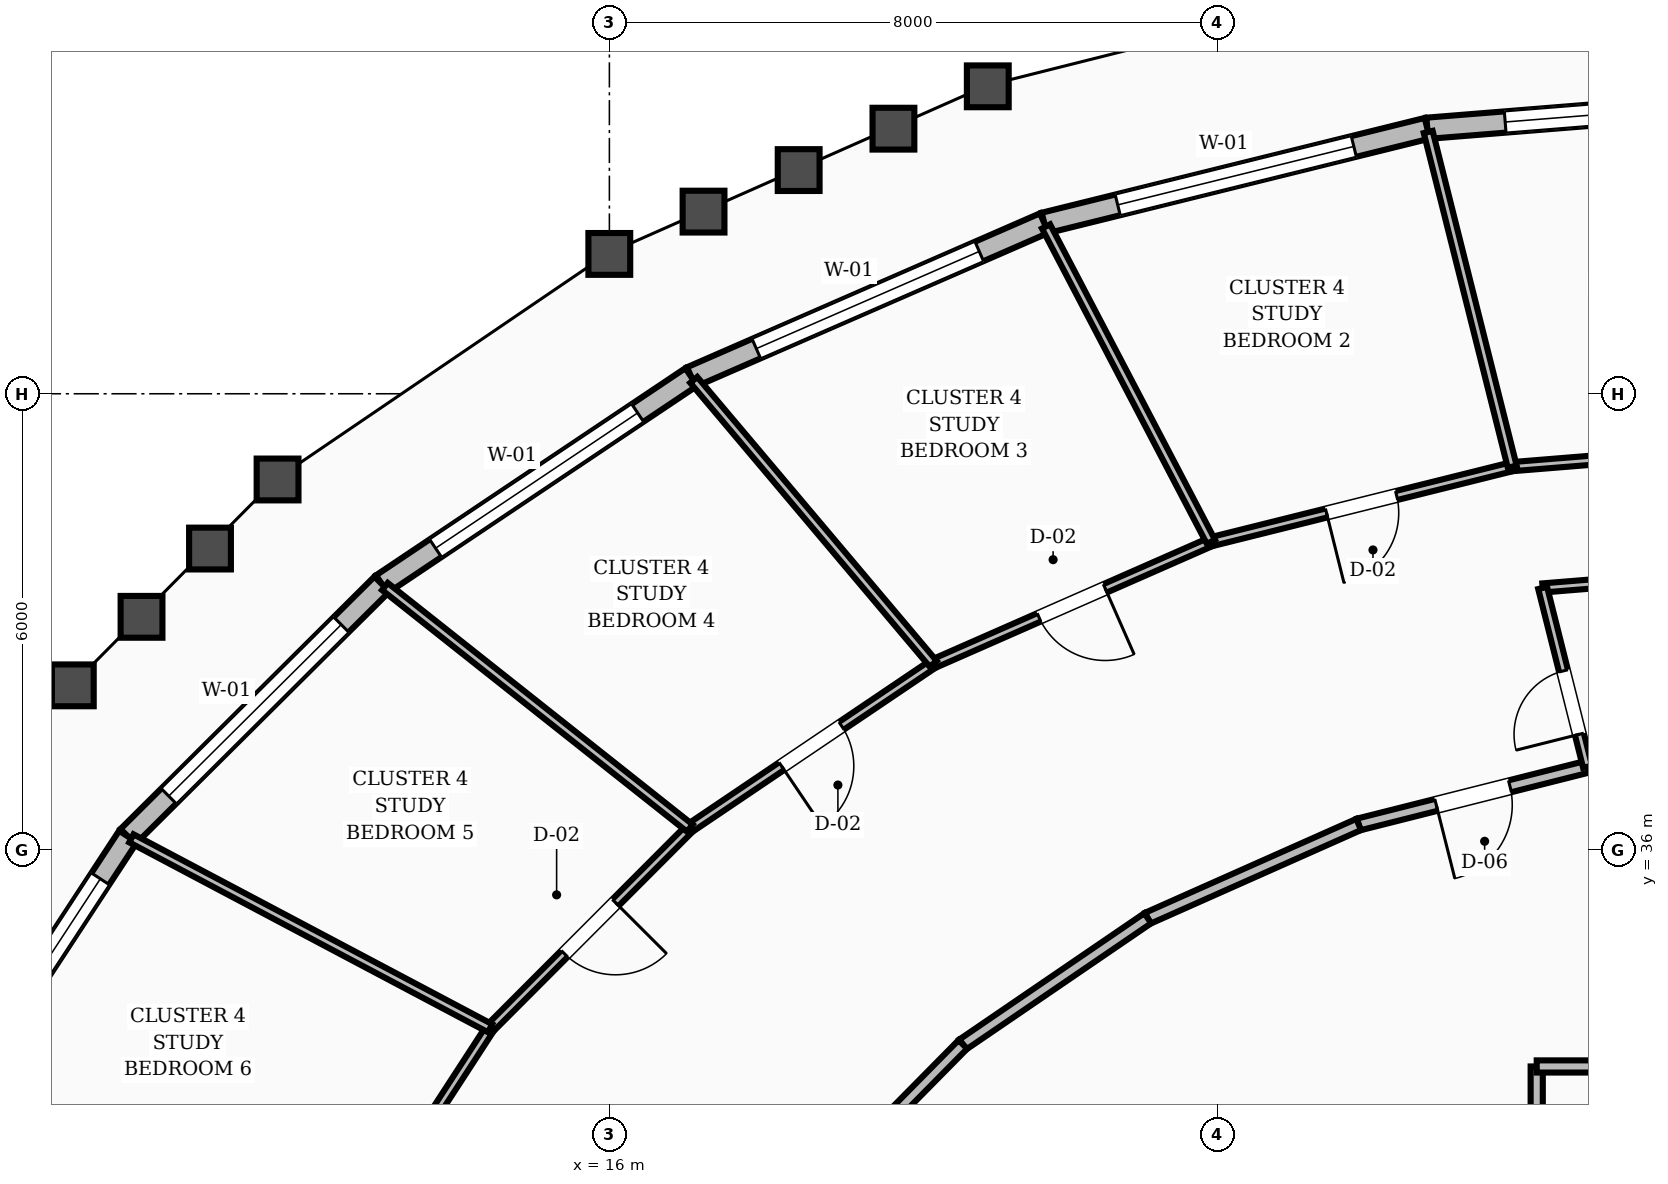
"""IFC4 building model, lengths in metres.
Left out: names, types, materials, properties, quantities, classifications, styles, units other than length and angle.
Written with IfcOpenShell. Run it as: python <this file> out.ifc"""

import sys

from ifc_helpers import new_model, si_unit, direction, frame, frame_2d, origin, place, context, subcontext, project, spatial, rectangle, extrude, element, fill, save


model = new_model("IFC4")
c1 = context("Model", 3, precision=1e-05, world=origin(), true_north=direction((0.0, 1.0)))
c2 = subcontext(c1, "Body", "Model", "MODEL_VIEW")
j1 = project(units=[si_unit("LENGTHUNIT", "METRE"), si_unit("PLANEANGLEUNIT", "RADIAN")], contexts=[c1])
p1 = place(None, origin())
s1 = spatial("IfcSite", under=j1, at=p1, CompositionType="ELEMENT")
p2 = place(p1, origin())
s2 = spatial("IfcBuilding", under=s1, at=p2, CompositionType="ELEMENT")
p3 = place(p2, frame((0.0, 0.0, 102.4)))
s3 = spatial("IfcBuildingStorey", under=s2, at=p3, CompositionType="ELEMENT", Elevation=102.4)
p4 = place(p3, frame((32.0, 45.914, 0.0), z_axis=(0.0, 0.0, 1.0), x_axis=(-0.996785824627, -0.080112544727, 0.0)))
e1 = element("IfcWall", 1, at=p4, inside=s3, PredefinedType="STANDARD", context=c2, shape_type="SweptSolid", body=[
    extrude(rectangle(XDim=5.257, YDim=0.28, at=frame_2d((2.628, 0.0))), origin(), (0.0, 0.0, 1.0), 2.67),
])
p5 = place(p4, frame((1.028, 0.0, 0.8)))
e2 = element("IfcOpeningElement", 2, at=p5, cuts=e1, PredefinedType="OPENING", context=c2, shape_type="SweptSolid", body=[
    extrude(rectangle(XDim=3.2, YDim=1.65, at=frame_2d((1.6, 0.825))), frame((0.0, 0.15, 0.0), z_axis=(0.0, -1.0, 0.0), x_axis=(1.0, 0.0, 0.0)), (0.0, 0.0, 1.0), 0.3),
])
p6 = place(p3, frame((26.76, 45.493, 0.0), z_axis=(0.0, 0.0, 1.0), x_axis=(-0.970712490552, -0.240244168891, 0.0)))
e3 = element("IfcWall", 3, at=p6, inside=s3, PredefinedType="STANDARD", context=c2, shape_type="SweptSolid", body=[
    extrude(rectangle(XDim=5.191, YDim=0.28, at=frame_2d((2.595, 0.0))), origin(), (0.0, 0.0, 1.0), 2.67),
])
p7 = place(p6, frame((0.995, 0.0, 0.8)))
e4 = element("IfcOpeningElement", 4, at=p7, cuts=e3, PredefinedType="OPENING", context=c2, shape_type="SweptSolid", body=[
    extrude(rectangle(XDim=3.2, YDim=1.65, at=frame_2d((1.6, 0.825))), frame((0.0, 0.15, 0.0), z_axis=(0.0, -1.0, 0.0), x_axis=(1.0, 0.0, 0.0)), (0.0, 0.0, 1.0), 0.3),
])
p8 = place(p3, frame((21.721, 44.246, 0.0), z_axis=(0.0, 0.0, 1.0), x_axis=(-0.916638922048, -0.399716257596, 0.0)))
e5 = element("IfcWall", 5, at=p8, inside=s3, PredefinedType="STANDARD", context=c2, shape_type="SweptSolid", body=[
    extrude(rectangle(XDim=5.066, YDim=0.28, at=frame_2d((2.533, 0.0))), origin(), (0.0, 0.0, 1.0), 2.67),
])
p9 = place(p8, frame((0.933, 0.0, 0.8)))
e6 = element("IfcOpeningElement", 6, at=p9, cuts=e5, PredefinedType="OPENING", context=c2, shape_type="SweptSolid", body=[
    extrude(rectangle(XDim=3.2, YDim=1.65, at=frame_2d((1.6, 0.825))), frame((0.0, 0.15, 0.0), z_axis=(0.0, -1.0, 0.0), x_axis=(1.0, 0.0, 0.0)), (0.0, 0.0, 1.0), 0.3),
])
p10 = place(p3, frame((17.078, 42.221, 0.0), z_axis=(0.0, 0.0, 1.0), x_axis=(-0.830936801798, -0.556366813728, 0.0)))
e7 = element("IfcWall", 7, at=p10, inside=s3, PredefinedType="STANDARD", context=c2, shape_type="SweptSolid", body=[
    extrude(rectangle(XDim=4.898, YDim=0.28, at=frame_2d((2.449, 0.0))), origin(), (0.0, 0.0, 1.0), 2.67),
])
p11 = place(p10, frame((0.849, 0.0, 0.8)))
e8 = element("IfcOpeningElement", 8, at=p11, cuts=e7, PredefinedType="OPENING", context=c2, shape_type="SweptSolid", body=[
    extrude(rectangle(XDim=3.2, YDim=1.65, at=frame_2d((1.6, 0.825))), frame((0.0, 0.15, 0.0), z_axis=(0.0, -1.0, 0.0), x_axis=(1.0, 0.0, 0.0)), (0.0, 0.0, 1.0), 0.3),
])
p12 = place(p3, frame((13.007, 39.495, 0.0), z_axis=(0.0, 0.0, 1.0), x_axis=(-0.709177055594, -0.705030427583, 0.0)))
e9 = element("IfcWall", 9, at=p12, inside=s3, PredefinedType="STANDARD", context=c2, shape_type="SweptSolid", body=[
    extrude(rectangle(XDim=4.71, YDim=0.28, at=frame_2d((2.355, 0.0))), origin(), (0.0, 0.0, 1.0), 2.67),
])
p13 = place(p12, frame((0.755, 0.0, 0.8)))
e10 = element("IfcOpeningElement", 10, at=p13, cuts=e9, PredefinedType="OPENING", context=c2, shape_type="SweptSolid", body=[
    extrude(rectangle(XDim=3.2, YDim=1.65, at=frame_2d((1.6, 0.825))), frame((0.0, 0.15, 0.0), z_axis=(0.0, -1.0, 0.0), x_axis=(1.0, 0.0, 0.0)), (0.0, 0.0, 1.0), 0.3),
])
p14 = place(p3, frame((9.667, 36.175, 0.0), z_axis=(0.0, 0.0, 1.0), x_axis=(-0.547989842324, -0.836484986542, 0.0)))
e11 = element("IfcWall", 11, at=p14, inside=s3, PredefinedType="STANDARD", context=c2, shape_type="SweptSolid", body=[
    extrude(rectangle(XDim=4.529, YDim=0.28, at=frame_2d((2.265, 0.0))), origin(), (0.0, 0.0, 1.0), 2.67),
])
p15 = place(p14, frame((0.665, 0.0, 0.8)))
e12 = element("IfcOpeningElement", 12, at=p15, cuts=e11, PredefinedType="OPENING", context=c2, shape_type="SweptSolid", body=[
    extrude(rectangle(XDim=3.2, YDim=1.65, at=frame_2d((1.6, 0.825))), frame((0.0, 0.15, 0.0), z_axis=(0.0, -1.0, 0.0), x_axis=(1.0, 0.0, 0.0)), (0.0, 0.0, 1.0), 0.3),
])
p16 = place(p3, frame((28.2, 31.45, 0.0), z_axis=(0.0, 0.0, 1.0), x_axis=(0.0, 1.0, 0.0)))
e13 = element("IfcWall", 13, at=p16, inside=s3, PredefinedType="SOLIDWALL", context=c2, shape_type="SweptSolid", body=[
    extrude(rectangle(XDim=1.7, YDim=0.16, at=frame_2d((0.85, 0.0))), origin(), (0.0, 0.0, 1.0), 2.67),
])
p17 = place(p3, frame((28.2, 33.15, 0.0), z_axis=(0.0, 0.0, 1.0), x_axis=(1.0, 0.0, 0.0)))
e14 = element("IfcWall", 14, at=p17, inside=s3, PredefinedType="SOLIDWALL", context=c2, shape_type="SweptSolid", body=[
    extrude(rectangle(XDim=7.6, YDim=0.16, at=frame_2d((3.8, 0.0))), origin(), (0.0, 0.0, 1.0), 2.67),
])
p18 = place(p17, frame((3.2, 0.0, 0.0)))
e15 = element("IfcOpeningElement", 15, at=p18, cuts=e14, PredefinedType="OPENING", context=c2, shape_type="SweptSolid", body=[
    extrude(rectangle(XDim=1.2, YDim=2.1, at=frame_2d((0.6, 1.05))), frame((0.0, 0.09, 0.0), z_axis=(0.0, -1.0, 0.0), x_axis=(1.0, 0.0, 0.0)), (0.0, 0.0, 1.0), 0.18),
])
p19 = place(p3, frame((32.0, 37.35, 0.0), z_axis=(0.0, 0.0, 1.0), x_axis=(-0.996658973252, -0.081675522876, 0.0)))
e16 = element("IfcWall", 16, at=p19, inside=s3, PredefinedType="SOLIDWALL", context=c2, shape_type="SweptSolid", body=[
    extrude(rectangle(XDim=3.142, YDim=0.16, at=frame_2d((1.571, 0.0))), origin(), (0.0, 0.0, 1.0), 2.67),
])
p20 = place(p3, frame((28.869, 37.094, 0.0), z_axis=(0.0, 0.0, 1.0), x_axis=(-0.969608333194, -0.244662380029, 0.0)))
e17 = element("IfcWall", 17, at=p20, inside=s3, PredefinedType="SOLIDWALL", context=c2, shape_type="SweptSolid", body=[
    extrude(rectangle(XDim=3.105, YDim=0.16, at=frame_2d((1.553, 0.0))), origin(), (0.0, 0.0, 1.0), 2.67),
])
p21 = place(p20, frame((1.053, 0.0, 0.0)))
e18 = element("IfcOpeningElement", 18, at=p21, cuts=e17, PredefinedType="OPENING", context=c2, shape_type="SweptSolid", body=[
    extrude(rectangle(XDim=1.0, YDim=2.1, at=frame_2d((0.5, 1.05))), frame((0.0, 0.09, 0.0), z_axis=(0.0, -1.0, 0.0), x_axis=(1.0, 0.0, 0.0)), (0.0, 0.0, 1.0), 0.18),
])
p22 = place(p3, frame((25.858, 36.334, 0.0), z_axis=(0.0, 0.0, 1.0), x_axis=(-0.913768445178, -0.406235434936, 0.0)))
e19 = element("IfcWall", 19, at=p22, inside=s3, PredefinedType="SOLIDWALL", context=c2, shape_type="SweptSolid", body=[
    extrude(rectangle(XDim=3.037, YDim=0.16, at=frame_2d((1.519, 0.0))), origin(), (0.0, 0.0, 1.0), 2.67),
])
p23 = place(p3, frame((23.083, 35.1, 0.0), z_axis=(0.0, 0.0, 1.0), x_axis=(-0.825929039072, -0.563774088104, 0.0)))
e20 = element("IfcWall", 20, at=p23, inside=s3, PredefinedType="SOLIDWALL", context=c2, shape_type="SweptSolid", body=[
    extrude(rectangle(XDim=2.945, YDim=0.16, at=frame_2d((1.472, 0.0))), origin(), (0.0, 0.0, 1.0), 2.67),
])
p24 = place(p3, frame((20.651, 33.44, 0.0), z_axis=(0.0, 0.0, 1.0), x_axis=(-0.702366174226, -0.711815816981, 0.0)))
e21 = element("IfcWall", 21, at=p24, inside=s3, PredefinedType="SOLIDWALL", context=c2, shape_type="SweptSolid", body=[
    extrude(rectangle(XDim=2.842, YDim=0.16, at=frame_2d((1.421, 0.0))), origin(), (0.0, 0.0, 1.0), 2.67),
])
p25 = place(p3, frame((32.0, 39.748, 0.0), z_axis=(0.0, 0.0, 1.0), x_axis=(-0.99671322873, -0.081010738021, 0.0)))
e22 = element("IfcWall", 22, at=p25, inside=s3, PredefinedType="PARTITIONING", context=c2, shape_type="SweptSolid", body=[
    extrude(rectangle(XDim=3.734, YDim=0.12, at=frame_2d((1.867, 0.0))), origin(), (0.0, 0.0, 1.0), 2.67),
])
p26 = place(p3, frame((28.869, 37.094, 0.0), z_axis=(0.0, 0.0, 1.0), x_axis=(-0.243554174744, 0.969887294465, 0.0)))
e23 = element("IfcWall", 23, at=p26, inside=s3, PredefinedType="PARTITIONING", context=c2, shape_type="SweptSolid", body=[
    extrude(rectangle(XDim=2.425, YDim=0.12, at=frame_2d((1.212, 0.0))), origin(), (0.0, 0.0, 1.0), 2.67),
])
p27 = place(p26, frame((0.44, 0.0, 0.0)))
e24 = element("IfcOpeningElement", 24, at=p27, cuts=e23, PredefinedType="OPENING", context=c2, shape_type="SweptSolid", body=[
    extrude(rectangle(XDim=0.86, YDim=2.1, at=frame_2d((0.43, 1.05))), frame((0.0, 0.07, 0.0), z_axis=(0.0, -1.0, 0.0), x_axis=(1.0, 0.0, 0.0)), (0.0, 0.0, 1.0), 0.14),
])
p28 = place(p3, frame((32.0, 41.375, 0.0), z_axis=(0.0, 0.0, 1.0), x_axis=(-0.996734058242, -0.080754053401, 0.0)))
e25 = element("IfcWall", 25, at=p28, inside=s3, PredefinedType="PARTITIONING", context=c2, shape_type="SweptSolid", body=[
    extrude(rectangle(XDim=4.136, YDim=0.12, at=frame_2d((2.068, 0.0))), origin(), (0.0, 0.0, 1.0), 2.67),
])
p29 = place(p28, frame((1.593, 0.0, 0.0)))
e26 = element("IfcOpeningElement", 26, at=p29, cuts=e25, PredefinedType="OPENING", context=c2, shape_type="SweptSolid", body=[
    extrude(rectangle(XDim=0.95, YDim=2.1, at=frame_2d((0.475, 1.05))), frame((0.0, 0.07, 0.0), z_axis=(0.0, -1.0, 0.0), x_axis=(1.0, 0.0, 0.0)), (0.0, 0.0, 1.0), 0.14),
])
p30 = place(p3, frame((27.878, 41.041, 0.0), z_axis=(0.0, 0.0, 1.0), x_axis=(-0.970268919394, -0.242029386767, 0.0)))
e27 = element("IfcWall", 27, at=p30, inside=s3, PredefinedType="PARTITIONING", context=c2, shape_type="SweptSolid", body=[
    extrude(rectangle(XDim=4.085, YDim=0.12, at=frame_2d((2.043, 0.0))), origin(), (0.0, 0.0, 1.0), 2.67),
])
p31 = place(p30, frame((1.568, 0.0, 0.0)))
e28 = element("IfcOpeningElement", 28, at=p31, cuts=e27, PredefinedType="OPENING", context=c2, shape_type="SweptSolid", body=[
    extrude(rectangle(XDim=0.95, YDim=2.1, at=frame_2d((0.475, 1.05))), frame((0.0, 0.07, 0.0), z_axis=(0.0, -1.0, 0.0), x_axis=(1.0, 0.0, 0.0)), (0.0, 0.0, 1.0), 0.14),
])
p32 = place(p3, frame((27.878, 41.041, 0.0), z_axis=(0.0, 0.0, 1.0), x_axis=(-0.243509845791, 0.969898425096, 0.0)))
e29 = element("IfcWall", 29, at=p32, inside=s3, PredefinedType="PARTITIONING", context=c2, shape_type="SweptSolid", body=[
    extrude(rectangle(XDim=4.54, YDim=0.12, at=frame_2d((2.27, 0.0))), origin(), (0.0, 0.0, 1.0), 2.67),
])
p33 = place(p3, frame((23.914, 40.052, 0.0), z_axis=(0.0, 0.0, 1.0), x_axis=(-0.915498969217, -0.402320316865, 0.0)))
e30 = element("IfcWall", 30, at=p33, inside=s3, PredefinedType="PARTITIONING", context=c2, shape_type="SweptSolid", body=[
    extrude(rectangle(XDim=3.99, YDim=0.12, at=frame_2d((1.995, 0.0))), origin(), (0.0, 0.0, 1.0), 2.67),
])
p34 = place(p33, frame((1.52, 0.0, 0.0)))
e31 = element("IfcOpeningElement", 31, at=p34, cuts=e30, PredefinedType="OPENING", context=c2, shape_type="SweptSolid", body=[
    extrude(rectangle(XDim=0.95, YDim=2.1, at=frame_2d((0.475, 1.05))), frame((0.0, 0.07, 0.0), z_axis=(0.0, -1.0, 0.0), x_axis=(1.0, 0.0, 0.0)), (0.0, 0.0, 1.0), 0.14),
])
p35 = place(p3, frame((23.914, 40.052, 0.0), z_axis=(0.0, 0.0, 1.0), x_axis=(-0.463346351545, 0.886177272621, 0.0)))
e32 = element("IfcWall", 32, at=p35, inside=s3, PredefinedType="PARTITIONING", context=c2, shape_type="SweptSolid", body=[
    extrude(rectangle(XDim=4.682, YDim=0.12, at=frame_2d((2.341, 0.0))), origin(), (0.0, 0.0, 1.0), 2.67),
])
p36 = place(p3, frame((20.26, 38.447, 0.0), z_axis=(0.0, 0.0, 1.0), x_axis=(-0.828896296571, -0.55940229668, 0.0)))
e33 = element("IfcWall", 33, at=p36, inside=s3, PredefinedType="PARTITIONING", context=c2, shape_type="SweptSolid", body=[
    extrude(rectangle(XDim=3.863, YDim=0.12, at=frame_2d((1.931, 0.0))), origin(), (0.0, 0.0, 1.0), 2.67),
])
p37 = place(p36, frame((1.456, 0.0, 0.0)))
e34 = element("IfcOpeningElement", 34, at=p37, cuts=e33, PredefinedType="OPENING", context=c2, shape_type="SweptSolid", body=[
    extrude(rectangle(XDim=0.95, YDim=2.1, at=frame_2d((0.475, 1.05))), frame((0.0, 0.07, 0.0), z_axis=(0.0, -1.0, 0.0), x_axis=(1.0, 0.0, 0.0)), (0.0, 0.0, 1.0), 0.14),
])
p38 = place(p3, frame((20.26, 38.447, 0.0), z_axis=(0.0, 0.0, 1.0), x_axis=(-0.644718627515, 0.764419970524, 0.0)))
e35 = element("IfcWall", 35, at=p38, inside=s3, PredefinedType="PARTITIONING", context=c2, shape_type="SweptSolid", body=[
    extrude(rectangle(XDim=4.887, YDim=0.12, at=frame_2d((2.443, 0.0))), origin(), (0.0, 0.0, 1.0), 2.67),
])
p39 = place(p3, frame((17.059, 36.286, 0.0), z_axis=(0.0, 0.0, 1.0), x_axis=(-0.706450168387, -0.707762784827, 0.0)))
e36 = element("IfcWall", 36, at=p39, inside=s3, PredefinedType="PARTITIONING", context=c2, shape_type="SweptSolid", body=[
    extrude(rectangle(XDim=3.72, YDim=0.12, at=frame_2d((1.86, 0.0))), origin(), (0.0, 0.0, 1.0), 2.67),
])
p40 = place(p39, frame((1.385, 0.0, 0.0)))
e37 = element("IfcOpeningElement", 37, at=p40, cuts=e36, PredefinedType="OPENING", context=c2, shape_type="SweptSolid", body=[
    extrude(rectangle(XDim=0.95, YDim=2.1, at=frame_2d((0.475, 1.05))), frame((0.0, 0.07, 0.0), z_axis=(0.0, -1.0, 0.0), x_axis=(1.0, 0.0, 0.0)), (0.0, 0.0, 1.0), 0.14),
])
p41 = place(p3, frame((17.059, 36.286, 0.0), z_axis=(0.0, 0.0, 1.0), x_axis=(-0.783824285958, 0.620982679905, 0.0)))
e38 = element("IfcWall", 38, at=p41, inside=s3, PredefinedType="PARTITIONING", context=c2, shape_type="SweptSolid", body=[
    extrude(rectangle(XDim=5.118, YDim=0.12, at=frame_2d((2.559, 0.0))), origin(), (0.0, 0.0, 1.0), 2.67),
])
p42 = place(p3, frame((14.431, 33.653, 0.0), z_axis=(0.0, 0.0, 1.0), x_axis=(-0.545007511922, -0.838431161127, 0.0)))
e39 = element("IfcWall", 39, at=p42, inside=s3, PredefinedType="PARTITIONING", context=c2, shape_type="SweptSolid", body=[
    extrude(rectangle(XDim=3.583, YDim=0.12, at=frame_2d((1.792, 0.0))), origin(), (0.0, 0.0, 1.0), 2.67),
])
p43 = place(p42, frame((1.316, 0.0, 0.0)))
e40 = element("IfcOpeningElement", 40, at=p43, cuts=e39, PredefinedType="OPENING", context=c2, shape_type="SweptSolid", body=[
    extrude(rectangle(XDim=0.95, YDim=2.1, at=frame_2d((0.475, 1.05))), frame((0.0, 0.07, 0.0), z_axis=(0.0, -1.0, 0.0), x_axis=(1.0, 0.0, 0.0)), (0.0, 0.0, 1.0), 0.14),
])
p44 = place(p3, frame((14.431, 33.653, 0.0), z_axis=(0.0, 0.0, 1.0), x_axis=(-0.883826837668, 0.467814194973, 0.0)))
e41 = element("IfcWall", 41, at=p44, inside=s3, PredefinedType="PARTITIONING", context=c2, shape_type="SweptSolid", body=[
    extrude(rectangle(XDim=5.34, YDim=0.12, at=frame_2d((2.67, 0.0))), origin(), (0.0, 0.0, 1.0), 2.67),
])
p45 = place(p5, origin())
e42 = element("IfcWindow", 42, at=p45, inside=s3, PartitioningType="SINGLE_PANEL", PredefinedType="WINDOW", context=c2, shape_type="SweptSolid", body=[
    extrude(rectangle(XDim=3.2, YDim=1.65, at=frame_2d((1.6, 0.825))), frame((0.0, 0.03, 0.0), z_axis=(0.0, -1.0, 0.0), x_axis=(1.0, 0.0, 0.0)), (0.0, 0.0, 1.0), 0.06),
])
fill(e2, e42)
p46 = place(p7, origin())
e43 = element("IfcWindow", 43, at=p46, inside=s3, PartitioningType="SINGLE_PANEL", PredefinedType="WINDOW", context=c2, shape_type="SweptSolid", body=[
    extrude(rectangle(XDim=3.2, YDim=1.65, at=frame_2d((1.6, 0.825))), frame((0.0, 0.03, 0.0), z_axis=(0.0, -1.0, 0.0), x_axis=(1.0, 0.0, 0.0)), (0.0, 0.0, 1.0), 0.06),
])
fill(e4, e43)
p47 = place(p9, origin())
e44 = element("IfcWindow", 44, at=p47, inside=s3, PartitioningType="SINGLE_PANEL", PredefinedType="WINDOW", context=c2, shape_type="SweptSolid", body=[
    extrude(rectangle(XDim=3.2, YDim=1.65, at=frame_2d((1.6, 0.825))), frame((0.0, 0.03, 0.0), z_axis=(0.0, -1.0, 0.0), x_axis=(1.0, 0.0, 0.0)), (0.0, 0.0, 1.0), 0.06),
])
fill(e6, e44)
p48 = place(p11, origin())
e45 = element("IfcWindow", 45, at=p48, inside=s3, PartitioningType="SINGLE_PANEL", PredefinedType="WINDOW", context=c2, shape_type="SweptSolid", body=[
    extrude(rectangle(XDim=3.2, YDim=1.65, at=frame_2d((1.6, 0.825))), frame((0.0, 0.03, 0.0), z_axis=(0.0, -1.0, 0.0), x_axis=(1.0, 0.0, 0.0)), (0.0, 0.0, 1.0), 0.06),
])
fill(e8, e45)
p49 = place(p13, origin())
e46 = element("IfcWindow", 46, at=p49, inside=s3, PartitioningType="SINGLE_PANEL", PredefinedType="WINDOW", context=c2, shape_type="SweptSolid", body=[
    extrude(rectangle(XDim=3.2, YDim=1.65, at=frame_2d((1.6, 0.825))), frame((0.0, 0.03, 0.0), z_axis=(0.0, -1.0, 0.0), x_axis=(1.0, 0.0, 0.0)), (0.0, 0.0, 1.0), 0.06),
])
fill(e10, e46)
p50 = place(p15, origin())
e47 = element("IfcWindow", 47, at=p50, inside=s3, PartitioningType="SINGLE_PANEL", PredefinedType="WINDOW", context=c2, shape_type="SweptSolid", body=[
    extrude(rectangle(XDim=3.2, YDim=1.65, at=frame_2d((1.6, 0.825))), frame((0.0, 0.03, 0.0), z_axis=(0.0, -1.0, 0.0), x_axis=(1.0, 0.0, 0.0)), (0.0, 0.0, 1.0), 0.06),
])
fill(e12, e47)
p51 = place(p27, origin())
e48 = element("IfcDoor", 48, at=p51, inside=s3, OperationType="SINGLE_SWING_LEFT", PredefinedType="DOOR", context=c2, shape_type="SweptSolid", body=[
    extrude(rectangle(XDim=0.86, YDim=2.1, at=frame_2d((0.43, 1.05))), frame((0.0, 0.025, 0.0), z_axis=(0.0, -1.0, 0.0), x_axis=(1.0, 0.0, 0.0)), (0.0, 0.0, 1.0), 0.05),
])
fill(e24, e48)
p52 = place(p21, origin())
e49 = element("IfcDoor", 49, at=p52, inside=s3, OperationType="SINGLE_SWING_RIGHT", PredefinedType="DOOR", context=c2, shape_type="SweptSolid", body=[
    extrude(rectangle(XDim=1.0, YDim=2.1, at=frame_2d((0.5, 1.05))), frame((0.0, 0.025, 0.0), z_axis=(0.0, -1.0, 0.0), x_axis=(1.0, 0.0, 0.0)), (0.0, 0.0, 1.0), 0.05),
])
fill(e18, e49)
p53 = place(p31, origin())
e50 = element("IfcDoor", 50, at=p53, inside=s3, OperationType="SINGLE_SWING_RIGHT", PredefinedType="DOOR", context=c2, shape_type="SweptSolid", body=[
    extrude(rectangle(XDim=0.95, YDim=2.1, at=frame_2d((0.475, 1.05))), frame((0.0, 0.025, 0.0), z_axis=(0.0, -1.0, 0.0), x_axis=(1.0, 0.0, 0.0)), (0.0, 0.0, 1.0), 0.05),
])
fill(e28, e50)
p54 = place(p34, origin())
e51 = element("IfcDoor", 51, at=p54, inside=s3, OperationType="SINGLE_SWING_LEFT", PredefinedType="DOOR", context=c2, shape_type="SweptSolid", body=[
    extrude(rectangle(XDim=0.95, YDim=2.1, at=frame_2d((0.475, 1.05))), frame((0.0, 0.025, 0.0), z_axis=(0.0, -1.0, 0.0), x_axis=(1.0, 0.0, 0.0)), (0.0, 0.0, 1.0), 0.05),
])
fill(e31, e51)
p55 = place(p37, origin())
e52 = element("IfcDoor", 52, at=p55, inside=s3, OperationType="SINGLE_SWING_RIGHT", PredefinedType="DOOR", context=c2, shape_type="SweptSolid", body=[
    extrude(rectangle(XDim=0.95, YDim=2.1, at=frame_2d((0.475, 1.05))), frame((0.0, 0.025, 0.0), z_axis=(0.0, -1.0, 0.0), x_axis=(1.0, 0.0, 0.0)), (0.0, 0.0, 1.0), 0.05),
])
fill(e34, e52)
p56 = place(p40, origin())
e53 = element("IfcDoor", 53, at=p56, inside=s3, OperationType="SINGLE_SWING_LEFT", PredefinedType="DOOR", context=c2, shape_type="SweptSolid", body=[
    extrude(rectangle(XDim=0.95, YDim=2.1, at=frame_2d((0.475, 1.05))), frame((0.0, 0.025, 0.0), z_axis=(0.0, -1.0, 0.0), x_axis=(1.0, 0.0, 0.0)), (0.0, 0.0, 1.0), 0.05),
])
fill(e37, e53)
save(model, sys.argv[1])
